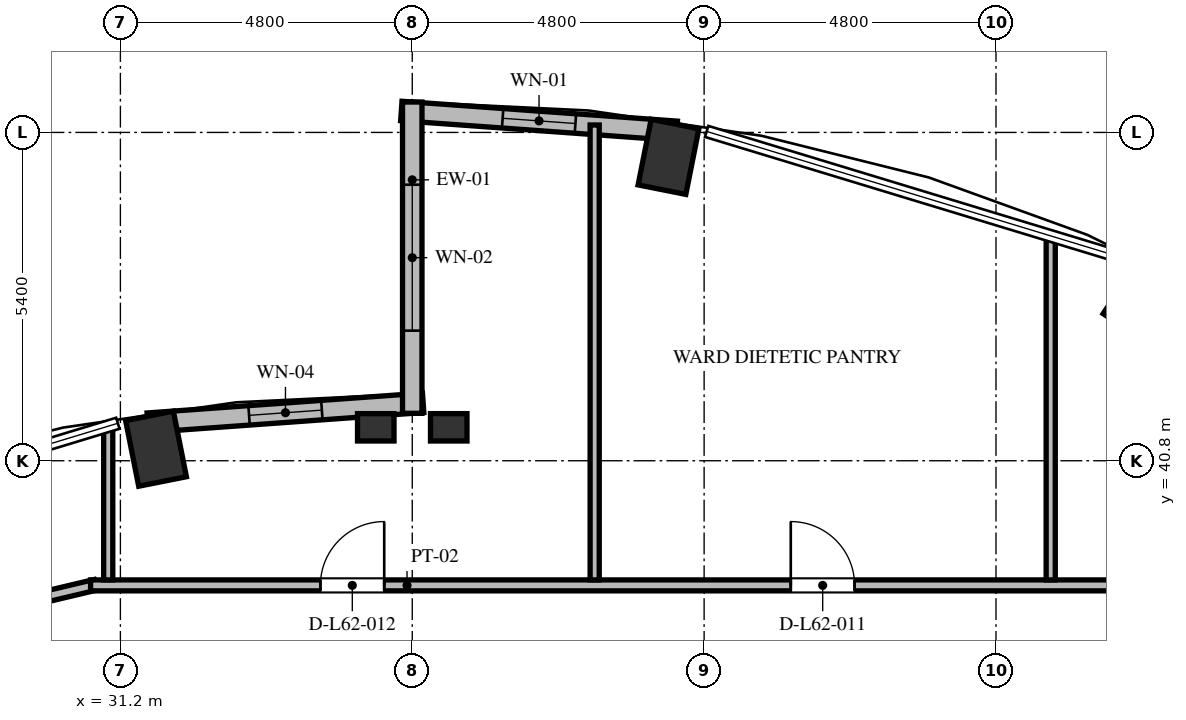
"""IFC4 building model, lengths in metres.
Left out: names, types, materials, properties, quantities, classifications, styles, units other than length and angle.
Written with IfcOpenShell. Run it as: python <this file> out.ifc"""

import sys

from ifc_helpers import new_model, si_unit, direction, frame, frame_2d, origin, origin_2d, place, context, subcontext, project, spatial, rectangle, extrude, element, fill, save


model = new_model("IFC4")
c1 = context("Model", 3, precision=1e-05, world=origin(), true_north=direction((0.0, 1.0)))
c2 = subcontext(c1, "Body", "Model", "MODEL_VIEW")
j1 = project(units=[si_unit("LENGTHUNIT", "METRE"), si_unit("PLANEANGLEUNIT", "RADIAN")], contexts=[c1])
p1 = place(None, origin())
s1 = spatial("IfcSite", under=j1, at=p1, CompositionType="ELEMENT")
p2 = place(p1, origin())
s2 = spatial("IfcBuilding", under=s1, at=p2, CompositionType="ELEMENT")
p3 = place(p2, frame((0.0, 0.0, 238.608)))
s3 = spatial("IfcBuildingStorey", under=s2, at=p3, CompositionType="ELEMENT", Elevation=238.608)
for number, where, z_axis, x_axis in (
    (1, (48.0, 43.454, 0.0), (0.0, 0.0, 1.0), (0.556, 0.831, 0.0)),
    (2, (40.214, 45.798, 0.0), (0.0, 0.0, 1.0), (0.195, 0.981, 0.0)),
    (3, (31.786, 40.998, 0.0), (0.0, 0.0, 1.0), (-0.195, 0.981, 0.0)),
):
    element("IfcColumn", number, at=place(p3, frame(where, z_axis=z_axis, x_axis=x_axis)), inside=s3, PredefinedType="COLUMN", context=c2, shape_type="SweptSolid", body=[
        extrude(rectangle(XDim=1.1, YDim=0.8, at=origin_2d()), origin(), (0.0, 0.0, 1.0), 3.648),
    ])
for number, where, z_axis, x_axis in (
    (4, (35.4, 41.35, 0.0), (0.0, 0.0, 1.0), (1.0, 0.0, 0.0)),
    (5, (36.6, 41.35, 0.0), (0.0, 0.0, 1.0), (1.0, 0.0, 0.0)),
):
    element("IfcColumn", number, at=place(p3, frame(where, z_axis=z_axis, x_axis=x_axis)), inside=s3, PredefinedType="PILASTER", context=c2, shape_type="SweptSolid", body=[
        extrude(rectangle(XDim=0.6, YDim=0.45, at=origin_2d()), origin(), (0.0, 0.0, 1.0), 3.648),
    ])
p4 = place(p3, frame((40.35, 46.226, 0.0), z_axis=(0.0, 0.0, 1.0), x_axis=(-0.997409061056, 0.071938619141, 0.0)))
e6 = element("IfcWall", 6, at=p4, inside=s3, PredefinedType="SOLIDWALL", context=c2, shape_type="SweptSolid", body=[
    extrude(rectangle(XDim=4.541, YDim=0.32, at=frame_2d((2.271, 0.0))), origin(), (0.0, 0.0, 1.0), 3.448),
])
p5 = place(p4, frame((1.67, 0.0, 0.85)))
e7 = element("IfcOpeningElement", 7, at=p5, cuts=e6, PredefinedType="OPENING", context=c2, shape_type="SweptSolid", body=[
    extrude(rectangle(XDim=1.2, YDim=2.2, at=frame_2d((0.6, 1.1))), frame((0.0, 0.17, 0.0), z_axis=(0.0, -1.0, 0.0), x_axis=(1.0, 0.0, 0.0)), (0.0, 0.0, 1.0), 0.34),
])
p6 = place(p3, frame((36.179, 41.753, 0.0), z_axis=(0.0, 0.0, 1.0), x_axis=(-0.997408782787, -0.071942477163, 0.0)))
e8 = element("IfcWall", 8, at=p6, inside=s3, PredefinedType="SOLIDWALL", context=c2, shape_type="SweptSolid", body=[
    extrude(rectangle(XDim=4.541, YDim=0.32, at=frame_2d((2.27, 0.0))), origin(), (0.0, 0.0, 1.0), 3.448),
])
p7 = place(p6, frame((1.67, 0.0, 0.85)))
e9 = element("IfcOpeningElement", 9, at=p7, cuts=e8, PredefinedType="OPENING", context=c2, shape_type="SweptSolid", body=[
    extrude(rectangle(XDim=1.2, YDim=1.8, at=frame_2d((0.6, 0.9))), frame((0.0, 0.17, 0.0), z_axis=(0.0, -1.0, 0.0), x_axis=(1.0, 0.0, 0.0)), (0.0, 0.0, 1.0), 0.34),
])
p8 = place(p3, frame((36.0, 46.7, 0.0), z_axis=(0.0, 0.0, 1.0), x_axis=(0.0, -1.0, 0.0)))
e10 = element("IfcWall", 10, at=p8, inside=s3, PredefinedType="SOLIDWALL", context=c2, shape_type="SweptSolid", body=[
    extrude(rectangle(XDim=5.12, YDim=0.32, at=frame_2d((2.56, 0.0))), origin(), (0.0, 0.0, 1.0), 3.448),
])
p9 = place(p8, frame((1.36, 0.0, 0.84)))
e11 = element("IfcOpeningElement", 11, at=p9, cuts=e10, PredefinedType="OPENING", context=c2, shape_type="SweptSolid", body=[
    extrude(rectangle(XDim=2.4, YDim=2.04, at=frame_2d((1.2, 1.02))), frame((0.0, 0.17, 0.0), z_axis=(0.0, -1.0, 0.0), x_axis=(1.0, 0.0, 0.0)), (0.0, 0.0, 1.0), 0.34),
])
p10 = place(p3, frame((28.476, 38.211, 0.0), z_axis=(0.0, 0.0, 1.0), x_axis=(0.973030562203, 0.230676234189, 0.0)))
e12 = element("IfcWall", 12, at=p10, inside=s3, PredefinedType="PARTITIONING", context=c2, shape_type="SweptSolid", body=[
    extrude(rectangle(XDim=2.377, YDim=0.18, at=frame_2d((1.188, 0.0))), origin(), (0.0, 0.0, 1.0), 3.448),
])
p11 = place(p3, frame((30.71, 38.75, 0.0), z_axis=(0.0, 0.0, 1.0), x_axis=(1.0, 0.0, 0.0)))
e13 = element("IfcWall", 13, at=p11, inside=s3, PredefinedType="PARTITIONING", context=c2, shape_type="SweptSolid", body=[
    extrude(rectangle(XDim=20.815, YDim=0.18, at=frame_2d((10.408, 0.0))), origin(), (0.0, 0.0, 1.0), 3.073),
])
p12 = place(p11, frame((11.515, 0.0, 0.0)))
e14 = element("IfcOpeningElement", 14, at=p12, cuts=e13, PredefinedType="OPENING", context=c2, shape_type="SweptSolid", body=[
    extrude(rectangle(XDim=1.05, YDim=2.15, at=frame_2d((0.525, 1.075))), frame((0.0, 0.1, 0.0), z_axis=(0.0, -1.0, 0.0), x_axis=(1.0, 0.0, 0.0)), (0.0, 0.0, 1.0), 0.2),
])
p13 = place(p11, frame((3.779, 0.0, 0.0)))
e15 = element("IfcOpeningElement", 15, at=p13, cuts=e13, PredefinedType="OPENING", context=c2, shape_type="SweptSolid", body=[
    extrude(rectangle(XDim=1.05, YDim=2.15, at=frame_2d((0.525, 1.075))), frame((0.0, 0.1, 0.0), z_axis=(0.0, -1.0, 0.0), x_axis=(1.0, 0.0, 0.0)), (0.0, 0.0, 1.0), 0.2),
])
p14 = place(p3, frame((31.0, 38.84, 0.0), z_axis=(0.0, 0.0, 1.0), x_axis=(0.0, 1.0, 0.0)))
e16 = element("IfcWall", 16, at=p14, inside=s3, PredefinedType="PARTITIONING", context=c2, shape_type="SweptSolid", body=[
    extrude(rectangle(XDim=2.511, YDim=0.15, at=frame_2d((1.256, 0.0))), origin(), (0.0, 0.0, 1.0), 3.448),
])
p15 = place(p3, frame((39.0, 38.84, 0.0), z_axis=(0.0, 0.0, 1.0), x_axis=(0.0, 1.0, 0.0)))
e17 = element("IfcWall", 17, at=p15, inside=s3, PredefinedType="PARTITIONING", context=c2, shape_type="SweptSolid", body=[
    extrude(rectangle(XDim=7.482, YDim=0.15, at=frame_2d((3.741, 0.0))), origin(), (0.0, 0.0, 1.0), 3.448),
])
p16 = place(p3, frame((46.5, 38.84, 0.0), z_axis=(0.0, 0.0, 1.0), x_axis=(0.0, 1.0, 0.0)))
e18 = element("IfcWall", 18, at=p16, inside=s3, PredefinedType="PARTITIONING", context=c2, shape_type="SweptSolid", body=[
    extrude(rectangle(XDim=5.641, YDim=0.15, at=frame_2d((2.821, 0.0))), origin(), (0.0, 0.0, 1.0), 3.448),
])
p17 = place(p5, origin())
e19 = element("IfcWindow", 19, at=p17, inside=s3, PartitioningType="SINGLE_PANEL", PredefinedType="WINDOW", context=c2, shape_type="SweptSolid", body=[
    extrude(rectangle(XDim=1.2, YDim=2.2, at=frame_2d((0.6, 1.1))), frame((0.0, 0.03, 0.0), z_axis=(0.0, -1.0, 0.0), x_axis=(1.0, 0.0, 0.0)), (0.0, 0.0, 1.0), 0.06),
])
fill(e7, e19)
p18 = place(p7, origin())
e20 = element("IfcWindow", 20, at=p18, inside=s3, PartitioningType="SINGLE_PANEL", PredefinedType="WINDOW", context=c2, shape_type="SweptSolid", body=[
    extrude(rectangle(XDim=1.2, YDim=1.8, at=frame_2d((0.6, 0.9))), frame((0.0, 0.03, 0.0), z_axis=(0.0, -1.0, 0.0), x_axis=(1.0, 0.0, 0.0)), (0.0, 0.0, 1.0), 0.06),
])
fill(e9, e20)
p19 = place(p9, origin())
e21 = element("IfcWindow", 21, at=p19, inside=s3, PartitioningType="SINGLE_PANEL", PredefinedType="WINDOW", context=c2, shape_type="SweptSolid", body=[
    extrude(rectangle(XDim=2.4, YDim=2.04, at=frame_2d((1.2, 1.02))), frame((0.0, 0.03, 0.0), z_axis=(0.0, -1.0, 0.0), x_axis=(1.0, 0.0, 0.0)), (0.0, 0.0, 1.0), 0.06),
])
fill(e11, e21)
p20 = place(p12, origin())
e22 = element("IfcDoor", 22, at=p20, inside=s3, OperationType="SINGLE_SWING_LEFT", PredefinedType="DOOR", context=c2, shape_type="SweptSolid", body=[
    extrude(rectangle(XDim=1.05, YDim=2.15, at=frame_2d((0.525, 1.075))), frame((0.0, 0.025, 0.0), z_axis=(0.0, -1.0, 0.0), x_axis=(1.0, 0.0, 0.0)), (0.0, 0.0, 1.0), 0.05),
])
fill(e14, e22)
p21 = place(p13, origin())
e23 = element("IfcDoor", 23, at=p21, inside=s3, OperationType="SINGLE_SWING_RIGHT", PredefinedType="DOOR", context=c2, shape_type="SweptSolid", body=[
    extrude(rectangle(XDim=1.05, YDim=2.15, at=frame_2d((0.525, 1.075))), frame((0.0, 0.025, 0.0), z_axis=(0.0, -1.0, 0.0), x_axis=(1.0, 0.0, 0.0)), (0.0, 0.0, 1.0), 0.05),
])
fill(e15, e23)
save(model, sys.argv[1])
